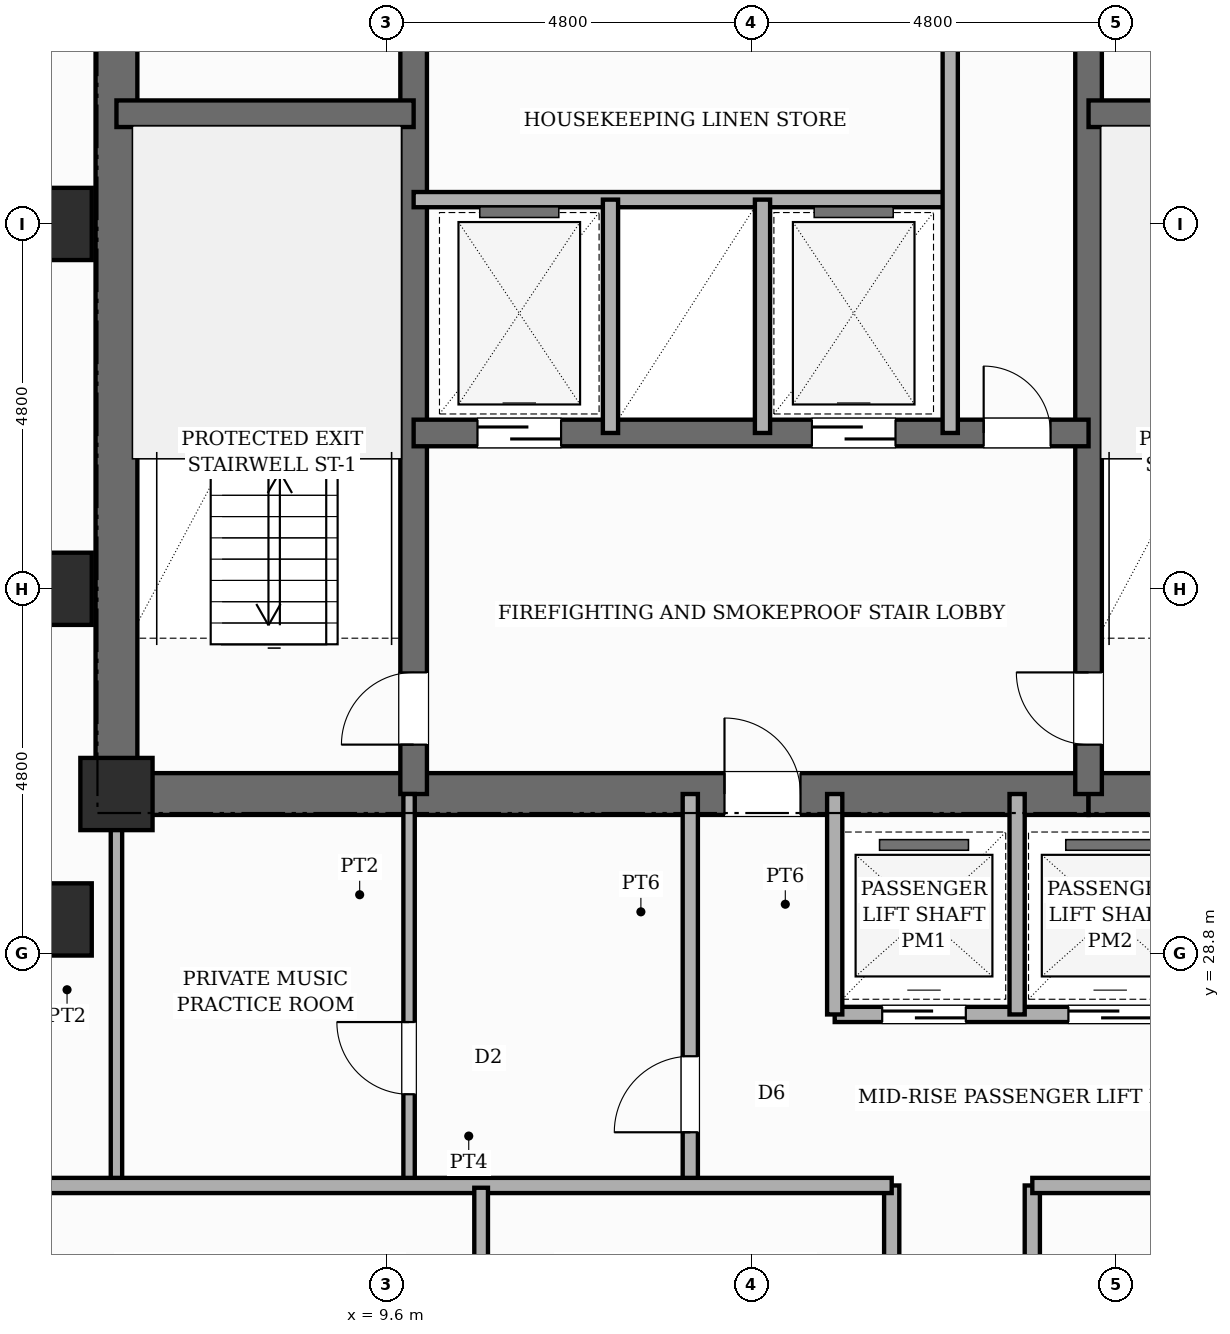
"""IFC4 building model, lengths in metres.
Left out: names, types, materials, properties, quantities, classifications, styles, units other than length and angle.
Written with IfcOpenShell. Run it as: python <this file> out.ifc"""

import sys

from ifc_helpers import new_model, si_unit, direction, frame, frame_2d, origin, origin_2d, place, context, subcontext, project, spatial, rectangle, extrude, element, fill, save


model = new_model("IFC4")
c1 = context("Model", 3, precision=1e-05, world=origin(), true_north=direction((0.0, 1.0)))
c2 = subcontext(c1, "Body", "Model", "MODEL_VIEW")
j1 = project(units=[si_unit("LENGTHUNIT", "METRE"), si_unit("PLANEANGLEUNIT", "RADIAN")], contexts=[c1])
p1 = place(None, origin())
s1 = spatial("IfcSite", under=j1, at=p1, CompositionType="ELEMENT")
p2 = place(p1, origin())
s2 = spatial("IfcBuilding", under=s1, at=p2, CompositionType="ELEMENT")
p3 = place(p2, frame((0.0, 0.0, 107.2)))
s3 = spatial("IfcBuildingStorey", under=s2, at=p3, CompositionType="ELEMENT", Elevation=107.2)
p4 = place(p3, frame((6.05, 30.625, 0.0), z_axis=(0.0, 0.0, 1.0), x_axis=(0.0, 1.0, 0.0)))
e1 = element("IfcWall", 1, at=p4, inside=s3, PredefinedType="SHEAR", context=c2, shape_type="SweptSolid", body=[
    extrude(rectangle(XDim=15.45, YDim=0.55, at=frame_2d((7.725, 0.0))), origin(), (0.0, 0.0, 1.0), 3.6),
])
p5 = place(p4, frame((10.725, 0.0, 0.0)))
e2 = element("IfcOpeningElement", 2, at=p5, cuts=e1, PredefinedType="OPENING", context=c2, shape_type="SweptSolid", body=[
    extrude(rectangle(XDim=0.95, YDim=2.15, at=frame_2d((0.475, 1.075))), frame((0.0, 0.285, 0.0), z_axis=(0.0, -1.0, 0.0), x_axis=(1.0, 0.0, 0.0)), (0.0, 0.0, 1.0), 0.57),
])
p6 = place(p3, frame((6.05, 30.9, 0.0), z_axis=(0.0, 0.0, 1.0), x_axis=(1.0, 0.0, 0.0)))
e3 = element("IfcWall", 3, at=p6, inside=s3, PredefinedType="SHEAR", context=c2, shape_type="SweptSolid", body=[
    extrude(rectangle(XDim=3.91, YDim=0.55, at=frame_2d((1.955, 0.0))), origin(), (0.0, 0.0, 1.0), 3.6),
])
p7 = place(p3, frame((9.96, 30.9, 0.0), z_axis=(0.0, 0.0, 1.0), x_axis=(1.0, 0.0, 0.0)))
e4 = element("IfcWall", 4, at=p7, inside=s3, PredefinedType="SHEAR", context=c2, shape_type="SweptSolid", body=[
    extrude(rectangle(XDim=8.88, YDim=0.55, at=frame_2d((4.44, 0.0))), origin(), (0.0, 0.0, 1.0), 3.6),
])
p8 = place(p7, frame((4.09, 0.0, 0.0)))
e5 = element("IfcOpeningElement", 5, at=p8, cuts=e4, PredefinedType="OPENING", context=c2, shape_type="SweptSolid", body=[
    extrude(rectangle(XDim=1.0, YDim=2.15, at=frame_2d((0.5, 1.075))), frame((0.0, 0.285, 0.0), z_axis=(0.0, -1.0, 0.0), x_axis=(1.0, 0.0, 0.0)), (0.0, 0.0, 1.0), 0.57),
])
p9 = place(p3, frame((18.84, 30.9, 0.0), z_axis=(0.0, 0.0, 1.0), x_axis=(1.0, 0.0, 0.0)))
e6 = element("IfcWall", 6, at=p9, inside=s3, PredefinedType="SHEAR", context=c2, shape_type="SweptSolid", body=[
    extrude(rectangle(XDim=3.91, YDim=0.55, at=frame_2d((1.955, 0.0))), origin(), (0.0, 0.0, 1.0), 3.6),
])
p10 = place(p3, frame((9.96, 30.9, 0.0), z_axis=(0.0, 0.0, 1.0), x_axis=(0.0, 1.0, 0.0)))
e7 = element("IfcWall", 7, at=p10, inside=s3, PredefinedType="SHEAR", context=c2, shape_type="SweptSolid", body=[
    extrude(rectangle(XDim=14.9, YDim=0.35, at=frame_2d((7.45, 0.0))), origin(), (0.0, 0.0, 1.0), 3.6),
])
p11 = place(p10, frame((0.65, 0.0, 0.0)))
e8 = element("IfcOpeningElement", 8, at=p11, cuts=e7, PredefinedType="OPENING", context=c2, shape_type="SweptSolid", body=[
    extrude(rectangle(XDim=0.95, YDim=2.1, at=frame_2d((0.475, 1.05))), frame((0.0, 0.185, 0.0), z_axis=(0.0, -1.0, 0.0), x_axis=(1.0, 0.0, 0.0)), (0.0, 0.0, 1.0), 0.37),
])
p12 = place(p10, frame((10.45, 0.0, 0.0)))
e9 = element("IfcOpeningElement", 9, at=p12, cuts=e7, PredefinedType="OPENING", context=c2, shape_type="SweptSolid", body=[
    extrude(rectangle(XDim=1.0, YDim=2.15, at=frame_2d((0.5, 1.075))), frame((0.0, 0.185, 0.0), z_axis=(0.0, -1.0, 0.0), x_axis=(1.0, 0.0, 0.0)), (0.0, 0.0, 1.0), 0.37),
])
p13 = place(p3, frame((18.84, 30.9, 0.0), z_axis=(0.0, 0.0, 1.0), x_axis=(0.0, 1.0, 0.0)))
e10 = element("IfcWall", 10, at=p13, inside=s3, PredefinedType="SHEAR", context=c2, shape_type="SweptSolid", body=[
    extrude(rectangle(XDim=14.9, YDim=0.35, at=frame_2d((7.45, 0.0))), origin(), (0.0, 0.0, 1.0), 3.6),
])
p14 = place(p13, frame((0.65, 0.0, 0.0)))
e11 = element("IfcOpeningElement", 11, at=p14, cuts=e10, PredefinedType="OPENING", context=c2, shape_type="SweptSolid", body=[
    extrude(rectangle(XDim=0.95, YDim=2.1, at=frame_2d((0.475, 1.05))), frame((0.0, 0.185, 0.0), z_axis=(0.0, -1.0, 0.0), x_axis=(1.0, 0.0, 0.0)), (0.0, 0.0, 1.0), 0.37),
])
p15 = place(p13, frame((10.45, 0.0, 0.0)))
e12 = element("IfcOpeningElement", 12, at=p15, cuts=e10, PredefinedType="OPENING", context=c2, shape_type="SweptSolid", body=[
    extrude(rectangle(XDim=1.0, YDim=2.15, at=frame_2d((0.5, 1.075))), frame((0.0, 0.185, 0.0), z_axis=(0.0, -1.0, 0.0), x_axis=(1.0, 0.0, 0.0)), (0.0, 0.0, 1.0), 0.37),
])
for number, where, z_axis, x_axis in (
    (13, (6.05, 39.85, 0.0), (0.0, 0.0, 1.0), (1.0, 0.0, 0.0)),
    (14, (18.84, 39.85, 0.0), (0.0, 0.0, 1.0), (1.0, 0.0, 0.0)),
):
    element("IfcWall", number, at=place(p3, frame(where, z_axis=z_axis, x_axis=x_axis)), inside=s3, PredefinedType="SHEAR", context=c2, shape_type="SweptSolid", body=[
        extrude(rectangle(XDim=3.91, YDim=0.35, at=frame_2d((1.955, 0.0))), origin(), (0.0, 0.0, 1.0), 3.6),
    ])
p16 = place(p3, frame((9.96, 35.65, 0.0), z_axis=(0.0, 0.0, 1.0), x_axis=(1.0, 0.0, 0.0)))
e15 = element("IfcWall", 15, at=p16, inside=s3, PredefinedType="SHEAR", context=c2, shape_type="SweptSolid", body=[
    extrude(rectangle(XDim=8.88, YDim=0.35, at=frame_2d((4.44, 0.0))), origin(), (0.0, 0.0, 1.0), 3.6),
])
p17 = place(p16, frame((0.84, 0.0, 0.0)))
e16 = element("IfcOpeningElement", 16, at=p17, cuts=e15, PredefinedType="OPENING", context=c2, shape_type="SweptSolid", body=[
    extrude(rectangle(XDim=1.1, YDim=2.15, at=frame_2d((0.55, 1.075))), frame((0.0, 0.185, 0.0), z_axis=(0.0, -1.0, 0.0), x_axis=(1.0, 0.0, 0.0)), (0.0, 0.0, 1.0), 0.37),
])
p18 = place(p16, frame((5.24, 0.0, 0.0)))
e17 = element("IfcOpeningElement", 17, at=p18, cuts=e15, PredefinedType="OPENING", context=c2, shape_type="SweptSolid", body=[
    extrude(rectangle(XDim=1.1, YDim=2.15, at=frame_2d((0.55, 1.075))), frame((0.0, 0.185, 0.0), z_axis=(0.0, -1.0, 0.0), x_axis=(1.0, 0.0, 0.0)), (0.0, 0.0, 1.0), 0.37),
])
p19 = place(p16, frame((7.5, 0.0, 0.0)))
e18 = element("IfcOpeningElement", 18, at=p19, cuts=e15, PredefinedType="OPENING", context=c2, shape_type="SweptSolid", body=[
    extrude(rectangle(XDim=0.88, YDim=2.1, at=frame_2d((0.44, 1.05))), frame((0.0, 0.185, 0.0), z_axis=(0.0, -1.0, 0.0), x_axis=(1.0, 0.0, 0.0)), (0.0, 0.0, 1.0), 0.37),
])
for number, where, z_axis, x_axis in (
    (19, (5.25, 29.25, 0.0), (0.0, 0.0, 1.0), (1.0, 0.0, 0.0)),
    (20, (5.25, 33.6, 0.0), (0.0, 0.0, 1.0), (1.0, 0.0, 0.0)),
    (21, (5.25, 38.4, 0.0), (0.0, 0.0, 1.0), (1.0, 0.0, 0.0)),
    (22, (6.05, 30.9, 0.0), (0.0, 0.0, 1.0), (1.0, 0.0, 0.0)),
):
    element("IfcColumn", number, at=place(p3, frame(where, z_axis=z_axis, x_axis=x_axis)), inside=s3, PredefinedType="COLUMN", context=c2, shape_type="SweptSolid", body=[
        extrude(rectangle(XDim=0.95, YDim=0.95, at=origin_2d()), origin(), (0.0, 0.0, 1.0), 3.6),
    ])
p20 = place(p3, frame((9.96, 38.72, 0.0), z_axis=(0.0, 0.0, 1.0), x_axis=(1.0, 0.0, 0.0)))
e23 = element("IfcWall", 23, at=p20, inside=s3, PredefinedType="POLYGONAL", context=c2, shape_type="SweptSolid", body=[
    extrude(rectangle(XDim=7.06, YDim=0.2, at=frame_2d((3.53, 0.0))), origin(), (0.0, 0.0, 1.0), 3.36),
])
for number, where, z_axis, x_axis in (
    (24, (12.55, 35.65, 0.0), (0.0, 0.0, 1.0), (0.0, 1.0, 0.0)),
    (25, (14.55, 35.65, 0.0), (0.0, 0.0, 1.0), (0.0, 1.0, 0.0)),
):
    element("IfcWall", number, at=place(p3, frame(where, z_axis=z_axis, x_axis=x_axis)), inside=s3, PredefinedType="POLYGONAL", context=c2, shape_type="SweptSolid", body=[
        extrude(rectangle(XDim=3.07, YDim=0.2, at=frame_2d((1.535, 0.0))), origin(), (0.0, 0.0, 1.0), 3.36),
    ])
p21 = place(p3, frame((17.02, 35.65, 0.0), z_axis=(0.0, 0.0, 1.0), x_axis=(0.0, 1.0, 0.0)))
e26 = element("IfcWall", 26, at=p21, inside=s3, PredefinedType="POLYGONAL", context=c2, shape_type="SweptSolid", body=[
    extrude(rectangle(XDim=5.15, YDim=0.2, at=frame_2d((2.575, 0.0))), origin(), (0.0, 0.0, 1.0), 3.36),
])
p22 = place(p3, frame((13.6, 25.75, 0.0), z_axis=(0.0, 0.0, 1.0), x_axis=(0.0, 1.0, 0.0)))
e27 = element("IfcWall", 27, at=p22, inside=s3, PredefinedType="POLYGONAL", context=c2, shape_type="SweptSolid", body=[
    extrude(rectangle(XDim=5.15, YDim=0.2, at=frame_2d((2.575, 0.0))), origin(), (0.0, 0.0, 1.0), 3.36),
])
p23 = place(p22, frame((0.7, 0.0, 0.0)))
e28 = element("IfcOpeningElement", 28, at=p23, cuts=e27, PredefinedType="OPENING", context=c2, shape_type="SweptSolid", body=[
    extrude(rectangle(XDim=1.0, YDim=2.15, at=frame_2d((0.5, 1.075))), frame((0.0, 0.11, 0.0), z_axis=(0.0, -1.0, 0.0), x_axis=(1.0, 0.0, 0.0)), (0.0, 0.0, 1.0), 0.22),
])
p24 = place(p3, frame((6.05, 25.75, 0.0), z_axis=(0.0, 0.0, 1.0), x_axis=(0.0, 1.0, 0.0)))
e29 = element("IfcWall", 29, at=p24, inside=s3, PredefinedType="PARTITIONING", context=c2, shape_type="SweptSolid", body=[
    extrude(rectangle(XDim=5.15, YDim=0.15, at=frame_2d((2.575, 0.0))), origin(), (0.0, 0.0, 1.0), 3.36),
])
p25 = place(p3, frame((9.9, 25.75, 0.0), z_axis=(0.0, 0.0, 1.0), x_axis=(0.0, 1.0, 0.0)))
e30 = element("IfcWall", 30, at=p25, inside=s3, PredefinedType="PARTITIONING", context=c2, shape_type="SweptSolid", body=[
    extrude(rectangle(XDim=5.15, YDim=0.15, at=frame_2d((2.575, 0.0))), origin(), (0.0, 0.0, 1.0), 3.36),
])
p26 = place(p25, frame((1.2, 0.0, 0.0)))
e31 = element("IfcOpeningElement", 31, at=p26, cuts=e30, PredefinedType="OPENING", context=c2, shape_type="SweptSolid", body=[
    extrude(rectangle(XDim=0.95, YDim=2.15, at=frame_2d((0.475, 1.075))), frame((0.0, 0.085, 0.0), z_axis=(0.0, -1.0, 0.0), x_axis=(1.0, 0.0, 0.0)), (0.0, 0.0, 1.0), 0.17),
])
p27 = place(p3, frame((15.5, 28.0, 0.0), z_axis=(0.0, 0.0, 1.0), x_axis=(1.0, 0.0, 0.0)))
e32 = element("IfcWall", 32, at=p27, inside=s3, PredefinedType="POLYGONAL", context=c2, shape_type="SweptSolid", body=[
    extrude(rectangle(XDim=7.25, YDim=0.2, at=frame_2d((3.625, 0.0))), origin(), (0.0, 0.0, 1.0), 3.36),
])
p28 = place(p27, frame((0.625, 0.0, 0.0)))
e33 = element("IfcOpeningElement", 33, at=p28, cuts=e32, PredefinedType="OPENING", context=c2, shape_type="SweptSolid", body=[
    extrude(rectangle(XDim=1.1, YDim=2.15, at=frame_2d((0.55, 1.075))), frame((0.0, 0.11, 0.0), z_axis=(0.0, -1.0, 0.0), x_axis=(1.0, 0.0, 0.0)), (0.0, 0.0, 1.0), 0.22),
])
p29 = place(p27, frame((3.075, 0.0, 0.0)))
e34 = element("IfcOpeningElement", 34, at=p29, cuts=e32, PredefinedType="OPENING", context=c2, shape_type="SweptSolid", body=[
    extrude(rectangle(XDim=1.1, YDim=2.15, at=frame_2d((0.55, 1.075))), frame((0.0, 0.11, 0.0), z_axis=(0.0, -1.0, 0.0), x_axis=(1.0, 0.0, 0.0)), (0.0, 0.0, 1.0), 0.22),
])
p30 = place(p27, frame((5.525, 0.0, 0.0)))
e35 = element("IfcOpeningElement", 35, at=p30, cuts=e32, PredefinedType="OPENING", context=c2, shape_type="SweptSolid", body=[
    extrude(rectangle(XDim=1.1, YDim=2.15, at=frame_2d((0.55, 1.075))), frame((0.0, 0.11, 0.0), z_axis=(0.0, -1.0, 0.0), x_axis=(1.0, 0.0, 0.0)), (0.0, 0.0, 1.0), 0.22),
])
for number, where, z_axis, x_axis in (
    (36, (15.5, 28.0, 0.0), (0.0, 0.0, 1.0), (0.0, 1.0, 0.0)),
    (37, (17.9, 28.0, 0.0), (0.0, 0.0, 1.0), (0.0, 1.0, 0.0)),
):
    element("IfcWall", number, at=place(p3, frame(where, z_axis=z_axis, x_axis=x_axis)), inside=s3, PredefinedType="POLYGONAL", context=c2, shape_type="SweptSolid", body=[
        extrude(rectangle(XDim=2.9, YDim=0.2, at=frame_2d((1.45, 0.0))), origin(), (0.0, 0.0, 1.0), 3.36),
    ])
p31 = place(p3, frame((16.25, 9.92, 0.0), z_axis=(0.0, 0.0, 1.0), x_axis=(0.0, 1.0, 0.0)))
e38 = element("IfcWall", 38, at=p31, inside=s3, PredefinedType="PARTITIONING", context=c2, shape_type="SweptSolid", body=[
    extrude(rectangle(XDim=15.83, YDim=0.2, at=frame_2d((7.915, 0.0))), origin(), (0.0, 0.0, 1.0), 3.36),
])
p32 = place(p31, frame((0.835, 0.0, 0.0)))
e39 = element("IfcOpeningElement", 39, at=p32, cuts=e38, PredefinedType="OPENING", context=c2, shape_type="SweptSolid", body=[
    extrude(rectangle(XDim=0.98, YDim=2.18, at=frame_2d((0.49, 1.09))), frame((0.0, 0.11, 0.0), z_axis=(0.0, -1.0, 0.0), x_axis=(1.0, 0.0, 0.0)), (0.0, 0.0, 1.0), 0.22),
])
p33 = place(p31, frame((4.415, 0.0, 0.0)))
e40 = element("IfcOpeningElement", 40, at=p33, cuts=e38, PredefinedType="OPENING", context=c2, shape_type="SweptSolid", body=[
    extrude(rectangle(XDim=0.98, YDim=2.18, at=frame_2d((0.49, 1.09))), frame((0.0, 0.11, 0.0), z_axis=(0.0, -1.0, 0.0), x_axis=(1.0, 0.0, 0.0)), (0.0, 0.0, 1.0), 0.22),
])
p34 = place(p31, frame((8.415, 0.0, 0.0)))
e41 = element("IfcOpeningElement", 41, at=p34, cuts=e38, PredefinedType="OPENING", context=c2, shape_type="SweptSolid", body=[
    extrude(rectangle(XDim=0.98, YDim=2.18, at=frame_2d((0.49, 1.09))), frame((0.0, 0.11, 0.0), z_axis=(0.0, -1.0, 0.0), x_axis=(1.0, 0.0, 0.0)), (0.0, 0.0, 1.0), 0.22),
])
p35 = place(p31, frame((12.28, 0.0, 0.0)))
e42 = element("IfcOpeningElement", 42, at=p35, cuts=e38, PredefinedType="OPENING", context=c2, shape_type="SweptSolid", body=[
    extrude(rectangle(XDim=0.98, YDim=2.18, at=frame_2d((0.49, 1.09))), frame((0.0, 0.11, 0.0), z_axis=(0.0, -1.0, 0.0), x_axis=(1.0, 0.0, 0.0)), (0.0, 0.0, 1.0), 0.22),
])
p36 = place(p3, frame((18.1, 9.92, 0.0), z_axis=(0.0, 0.0, 1.0), x_axis=(0.0, 1.0, 0.0)))
e43 = element("IfcWall", 43, at=p36, inside=s3, PredefinedType="PARTITIONING", context=c2, shape_type="SweptSolid", body=[
    extrude(rectangle(XDim=15.83, YDim=0.2, at=frame_2d((7.915, 0.0))), origin(), (0.0, 0.0, 1.0), 3.36),
])
p37 = place(p36, frame((0.946, 0.0, 0.0)))
e44 = element("IfcOpeningElement", 44, at=p37, cuts=e43, PredefinedType="OPENING", context=c2, shape_type="SweptSolid", body=[
    extrude(rectangle(XDim=0.98, YDim=2.18, at=frame_2d((0.49, 1.09))), frame((0.0, 0.11, 0.0), z_axis=(0.0, -1.0, 0.0), x_axis=(1.0, 0.0, 0.0)), (0.0, 0.0, 1.0), 0.22),
])
p38 = place(p36, frame((5.956, 0.0, 0.0)))
e45 = element("IfcOpeningElement", 45, at=p38, cuts=e43, PredefinedType="OPENING", context=c2, shape_type="SweptSolid", body=[
    extrude(rectangle(XDim=0.98, YDim=2.18, at=frame_2d((0.49, 1.09))), frame((0.0, 0.11, 0.0), z_axis=(0.0, -1.0, 0.0), x_axis=(1.0, 0.0, 0.0)), (0.0, 0.0, 1.0), 0.22),
])
p39 = place(p36, frame((11.356, 0.0, 0.0)))
e46 = element("IfcOpeningElement", 46, at=p39, cuts=e43, PredefinedType="OPENING", context=c2, shape_type="SweptSolid", body=[
    extrude(rectangle(XDim=0.98, YDim=2.18, at=frame_2d((0.49, 1.09))), frame((0.0, 0.11, 0.0), z_axis=(0.0, -1.0, 0.0), x_axis=(1.0, 0.0, 0.0)), (0.0, 0.0, 1.0), 0.22),
])
p40 = place(p3, frame((5.12, 25.75, 0.0), z_axis=(0.0, 0.0, 1.0), x_axis=(1.0, 0.0, 0.0)))
e47 = element("IfcWall", 47, at=p40, inside=s3, PredefinedType="PARTITIONING", context=c2, shape_type="SweptSolid", body=[
    extrude(rectangle(XDim=11.13, YDim=0.2, at=frame_2d((5.565, 0.0))), origin(), (0.0, 0.0, 1.0), 3.36),
])
p41 = place(p3, frame((18.1, 25.75, 0.0), z_axis=(0.0, 0.0, 1.0), x_axis=(1.0, 0.0, 0.0)))
e48 = element("IfcWall", 48, at=p41, inside=s3, PredefinedType="PARTITIONING", context=c2, shape_type="SweptSolid", body=[
    extrude(rectangle(XDim=5.58, YDim=0.2, at=frame_2d((2.79, 0.0))), origin(), (0.0, 0.0, 1.0), 3.36),
])
p42 = place(p3, frame((10.848, 23.74, 0.0), z_axis=(0.0, 0.0, 1.0), x_axis=(0.0, 1.0, 0.0)))
e49 = element("IfcWall", 49, at=p42, inside=s3, PredefinedType="PLUMBINGWALL", context=c2, shape_type="SweptSolid", body=[
    extrude(rectangle(XDim=1.98, YDim=0.18, at=frame_2d((0.99, 0.0))), origin(), (0.0, 0.0, 1.0), 3.36),
])
p43 = place(p11, origin())
e50 = element("IfcDoor", 50, at=p43, inside=s3, OperationType="SINGLE_SWING_LEFT", PredefinedType="DOOR", context=c2, shape_type="SweptSolid", body=[
    extrude(rectangle(XDim=0.95, YDim=2.1, at=frame_2d((0.475, 1.05))), frame((0.0, 0.025, 0.0), z_axis=(0.0, -1.0, 0.0), x_axis=(1.0, 0.0, 0.0)), (0.0, 0.0, 1.0), 0.05),
])
fill(e8, e50)
p44 = place(p14, origin())
e51 = element("IfcDoor", 51, at=p44, inside=s3, OperationType="SINGLE_SWING_RIGHT", PredefinedType="DOOR", context=c2, shape_type="SweptSolid", body=[
    extrude(rectangle(XDim=0.95, YDim=2.1, at=frame_2d((0.475, 1.05))), frame((0.0, 0.025, 0.0), z_axis=(0.0, -1.0, 0.0), x_axis=(1.0, 0.0, 0.0)), (0.0, 0.0, 1.0), 0.05),
])
fill(e11, e51)
p45 = place(p8, origin())
e52 = element("IfcDoor", 52, at=p45, inside=s3, OperationType="SINGLE_SWING_LEFT", PredefinedType="DOOR", context=c2, shape_type="SweptSolid", body=[
    extrude(rectangle(XDim=1.0, YDim=2.15, at=frame_2d((0.5, 1.075))), frame((0.0, 0.025, 0.0), z_axis=(0.0, -1.0, 0.0), x_axis=(1.0, 0.0, 0.0)), (0.0, 0.0, 1.0), 0.05),
])
fill(e5, e52)
p46 = place(p17, origin())
e53 = element("IfcDoor", 53, at=p46, inside=s3, OperationType="SLIDING_TO_LEFT", PredefinedType="DOOR", context=c2, shape_type="SweptSolid", body=[
    extrude(rectangle(XDim=1.1, YDim=2.15, at=frame_2d((0.55, 1.075))), frame((0.0, 0.025, 0.0), z_axis=(0.0, -1.0, 0.0), x_axis=(1.0, 0.0, 0.0)), (0.0, 0.0, 1.0), 0.05),
])
fill(e16, e53)
p47 = place(p18, origin())
e54 = element("IfcDoor", 54, at=p47, inside=s3, OperationType="SLIDING_TO_RIGHT", PredefinedType="DOOR", context=c2, shape_type="SweptSolid", body=[
    extrude(rectangle(XDim=1.1, YDim=2.15, at=frame_2d((0.55, 1.075))), frame((0.0, 0.025, 0.0), z_axis=(0.0, -1.0, 0.0), x_axis=(1.0, 0.0, 0.0)), (0.0, 0.0, 1.0), 0.05),
])
fill(e17, e54)
p48 = place(p19, origin())
e55 = element("IfcDoor", 55, at=p48, inside=s3, OperationType="SINGLE_SWING_LEFT", PredefinedType="DOOR", context=c2, shape_type="SweptSolid", body=[
    extrude(rectangle(XDim=0.88, YDim=2.1, at=frame_2d((0.44, 1.05))), frame((0.0, 0.025, 0.0), z_axis=(0.0, -1.0, 0.0), x_axis=(1.0, 0.0, 0.0)), (0.0, 0.0, 1.0), 0.05),
])
fill(e18, e55)
p49 = place(p23, origin())
e56 = element("IfcDoor", 56, at=p49, inside=s3, OperationType="SINGLE_SWING_LEFT", PredefinedType="DOOR", context=c2, shape_type="SweptSolid", body=[
    extrude(rectangle(XDim=1.0, YDim=2.15, at=frame_2d((0.5, 1.075))), frame((0.0, 0.025, 0.0), z_axis=(0.0, -1.0, 0.0), x_axis=(1.0, 0.0, 0.0)), (0.0, 0.0, 1.0), 0.05),
])
fill(e28, e56)
p50 = place(p26, origin())
e57 = element("IfcDoor", 57, at=p50, inside=s3, OperationType="SINGLE_SWING_RIGHT", PredefinedType="DOOR", context=c2, shape_type="SweptSolid", body=[
    extrude(rectangle(XDim=0.95, YDim=2.15, at=frame_2d((0.475, 1.075))), frame((0.0, 0.025, 0.0), z_axis=(0.0, -1.0, 0.0), x_axis=(1.0, 0.0, 0.0)), (0.0, 0.0, 1.0), 0.05),
])
fill(e31, e57)
p51 = place(p28, origin())
e58 = element("IfcDoor", 58, at=p51, inside=s3, OperationType="SLIDING_TO_LEFT", PredefinedType="DOOR", context=c2, shape_type="SweptSolid", body=[
    extrude(rectangle(XDim=1.1, YDim=2.15, at=frame_2d((0.55, 1.075))), frame((0.0, 0.025, 0.0), z_axis=(0.0, -1.0, 0.0), x_axis=(1.0, 0.0, 0.0)), (0.0, 0.0, 1.0), 0.05),
])
fill(e33, e58)
p52 = place(p29, origin())
e59 = element("IfcDoor", 59, at=p52, inside=s3, OperationType="SLIDING_TO_RIGHT", PredefinedType="DOOR", context=c2, shape_type="SweptSolid", body=[
    extrude(rectangle(XDim=1.1, YDim=2.15, at=frame_2d((0.55, 1.075))), frame((0.0, 0.025, 0.0), z_axis=(0.0, -1.0, 0.0), x_axis=(1.0, 0.0, 0.0)), (0.0, 0.0, 1.0), 0.05),
])
fill(e34, e59)
save(model, sys.argv[1])
